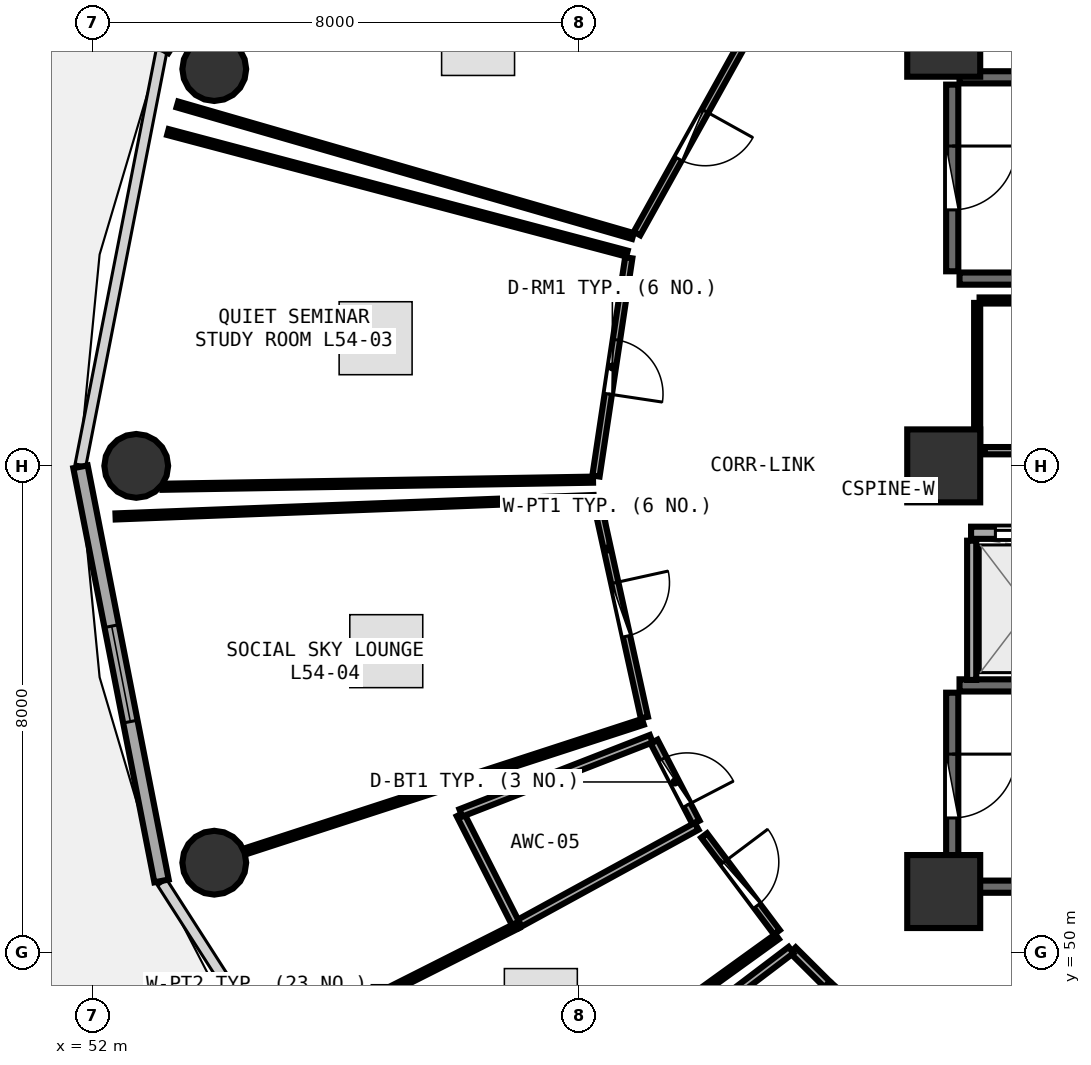
"""IFC4 building model, lengths in metres.
Left out: names, types, materials, properties, quantities, classifications, styles, units other than length and angle.
Written with IfcOpenShell. Run it as: python <this file> out.ifc"""

import sys

from ifc_helpers import new_model, si_unit, direction, frame, frame_2d, origin, origin_2d, place, context, subcontext, project, spatial, rectangle, circle, extrude, element, fill, save


model = new_model("IFC4")
c1 = context("Model", 3, precision=1e-05, world=origin(), true_north=direction((0.0, 1.0)))
c2 = subcontext(c1, "Body", "Model", "MODEL_VIEW")
j1 = project(units=[si_unit("LENGTHUNIT", "METRE"), si_unit("PLANEANGLEUNIT", "RADIAN")], contexts=[c1])
p1 = place(None, origin())
s1 = spatial("IfcSite", under=j1, at=p1, CompositionType="ELEMENT")
p2 = place(p1, origin())
s2 = spatial("IfcBuilding", under=s1, at=p2, CompositionType="ELEMENT")
p3 = place(p2, frame((0.0, 0.0, 211.95)))
s3 = spatial("IfcBuildingStorey", under=s2, at=p3, CompositionType="ELEMENT", Elevation=211.95)
for number, where, z_axis, x_axis in (
    (1, (66.0, 51.0, 0.0), (0.0, 0.0, 1.0), (1.0, 0.0, 0.0)),
    (2, (66.0, 65.0, 0.0), (0.0, 0.0, 1.0), (1.0, 0.0, 0.0)),
    (3, (66.0, 58.0, 0.0), (0.0, 0.0, 1.0), (1.0, 0.0, 0.0)),
):
    element("IfcColumn", number, at=place(p3, frame(where, z_axis=z_axis, x_axis=x_axis)), inside=s3, PredefinedType="PILASTER", context=c2, shape_type="SweptSolid", body=[
        extrude(rectangle(XDim=1.2, YDim=1.2, at=origin_2d()), origin(), (0.0, 0.0, 1.0), 3.75),
    ])
for number, where, z_axis, x_axis in (
    (4, (54.003, 64.526, 0.0), (0.0, 0.0, 1.0), (1.0, 0.0, 0.0)),
    (5, (52.72, 58.0, 0.0), (0.0, 0.0, 1.0), (1.0, 0.0, 0.0)),
    (6, (54.003, 51.474, 0.0), (0.0, 0.0, 1.0), (1.0, 0.0, 0.0)),
):
    element("IfcColumn", number, at=place(p3, frame(where, z_axis=z_axis, x_axis=x_axis)), inside=s3, PredefinedType="COLUMN", context=c2, shape_type="SweptSolid", body=[
        extrude(circle(Radius=0.525, at=origin_2d()), origin(), (0.0, 0.0, 1.0), 3.75),
    ])
p4 = place(p3, frame((56.986, 70.843, 0.0), z_axis=(0.0, 0.0, 1.0), x_axis=(-0.539539512973, -0.841960280501, 0.0)))
e7 = element("IfcWall", 7, at=p4, inside=s3, PredefinedType="SOLIDWALL", context=c2, shape_type="SweptSolid", body=[
    extrude(rectangle(XDim=7.115, YDim=0.24, at=frame_2d((3.557, 0.0))), origin(), (0.0, 0.0, 1.0), 3.475),
])
p5 = place(p4, frame((3.082, 0.0, 0.0)))
e8 = element("IfcOpeningElement", 8, at=p5, cuts=e7, PredefinedType="OPENING", context=c2, shape_type="SweptSolid", body=[
    extrude(rectangle(XDim=0.95, YDim=2.1, at=frame_2d((0.475, 1.05))), frame((0.0, 0.13, 0.0), z_axis=(0.0, -1.0, 0.0), x_axis=(1.0, 0.0, 0.0)), (0.0, 0.0, 1.0), 0.26),
])
p6 = place(p4, frame((4.382, 0.0, 0.85)))
e9 = element("IfcOpeningElement", 9, at=p6, cuts=e7, PredefinedType="OPENING", context=c2, shape_type="SweptSolid", body=[
    extrude(rectangle(XDim=1.2, YDim=1.45, at=frame_2d((0.6, 0.725))), frame((0.0, 0.13, 0.0), z_axis=(0.0, -1.0, 0.0), x_axis=(1.0, 0.0, 0.0)), (0.0, 0.0, 1.0), 0.26),
])
p7 = place(p3, frame((51.803, 57.985, 0.0), z_axis=(0.0, 0.0, 1.0), x_axis=(0.192069055673, -0.981381413036, 0.0)))
e10 = element("IfcWall", 10, at=p7, inside=s3, PredefinedType="SOLIDWALL", context=c2, shape_type="SweptSolid", body=[
    extrude(rectangle(XDim=6.94, YDim=0.24, at=frame_2d((3.47, 0.0))), origin(), (0.0, 0.0, 1.0), 3.475),
])
p8 = place(p7, frame((2.67, 0.0, 0.85)))
e11 = element("IfcOpeningElement", 11, at=p8, cuts=e10, PredefinedType="OPENING", context=c2, shape_type="SweptSolid", body=[
    extrude(rectangle(XDim=1.6, YDim=1.45, at=frame_2d((0.8, 0.725))), frame((0.0, 0.13, 0.0), z_axis=(0.0, -1.0, 0.0), x_axis=(1.0, 0.0, 0.0)), (0.0, 0.0, 1.0), 0.26),
])
for number, where, z_axis, x_axis in (
    (12, (66.26, 61.08, 0.0), (0.0, 0.0, 1.0), (1.0, 0.0, 0.0)),
    (13, (73.42, 64.39, 0.0), (0.0, 0.0, 1.0), (-1.0, 0.0, 0.0)),
):
    element("IfcWall", number, at=place(p3, frame(where, z_axis=z_axis, x_axis=x_axis)), inside=s3, PredefinedType="SHEAR", context=c2, shape_type="SweptSolid", body=[
        extrude(rectangle(XDim=7.16, YDim=0.2, at=frame_2d((3.58, 0.0))), origin(), (0.0, 0.0, 1.0), 3.49),
    ])
p9 = place(p3, frame((66.14, 64.27, 0.0), z_axis=(0.0, 0.0, 1.0), x_axis=(0.0, -1.0, 0.0)))
e14 = element("IfcWall", 14, at=p9, inside=s3, PredefinedType="SHEAR", context=c2, shape_type="SweptSolid", body=[
    extrude(rectangle(XDim=3.07, YDim=0.2, at=frame_2d((1.535, 0.0))), origin(), (0.0, 0.0, 1.0), 3.49),
])
p10 = place(p9, frame((1.01, 0.0, 0.0)))
e15 = element("IfcOpeningElement", 15, at=p10, cuts=e14, PredefinedType="OPENING", context=c2, shape_type="SweptSolid", body=[
    extrude(rectangle(XDim=1.05, YDim=2.1, at=frame_2d((0.525, 1.05))), frame((0.0, 0.11, 0.0), z_axis=(0.0, -1.0, 0.0), x_axis=(1.0, 0.0, 0.0)), (0.0, 0.0, 1.0), 0.22),
])
for number, where, z_axis, x_axis in (
    (16, (66.26, 51.08, 0.0), (0.0, 0.0, 1.0), (1.0, 0.0, 0.0)),
    (17, (73.42, 54.39, 0.0), (0.0, 0.0, 1.0), (-1.0, 0.0, 0.0)),
):
    element("IfcWall", number, at=place(p3, frame(where, z_axis=z_axis, x_axis=x_axis)), inside=s3, PredefinedType="SHEAR", context=c2, shape_type="SweptSolid", body=[
        extrude(rectangle(XDim=7.16, YDim=0.2, at=frame_2d((3.58, 0.0))), origin(), (0.0, 0.0, 1.0), 3.49),
    ])
p11 = place(p3, frame((66.14, 54.27, 0.0), z_axis=(0.0, 0.0, 1.0), x_axis=(0.0, -1.0, 0.0)))
e18 = element("IfcWall", 18, at=p11, inside=s3, PredefinedType="SHEAR", context=c2, shape_type="SweptSolid", body=[
    extrude(rectangle(XDim=3.07, YDim=0.2, at=frame_2d((1.535, 0.0))), origin(), (0.0, 0.0, 1.0), 3.49),
])
p12 = place(p11, frame((1.01, 0.0, 0.0)))
e19 = element("IfcOpeningElement", 19, at=p12, cuts=e18, PredefinedType="OPENING", context=c2, shape_type="SweptSolid", body=[
    extrude(rectangle(XDim=1.05, YDim=2.1, at=frame_2d((0.525, 1.05))), frame((0.0, 0.11, 0.0), z_axis=(0.0, -1.0, 0.0), x_axis=(1.0, 0.0, 0.0)), (0.0, 0.0, 1.0), 0.22),
])
p13 = place(p3, frame((66.45, 56.9, 0.0), z_axis=(0.0, 0.0, 1.0), x_axis=(1.0, 0.0, 0.0)))
e20 = element("IfcWall", 20, at=p13, inside=s3, PredefinedType="SOLIDWALL", context=c2, shape_type="SweptSolid", body=[
    extrude(rectangle(XDim=14.4, YDim=0.2, at=frame_2d((7.2, 0.0))), origin(), (0.0, 0.0, 1.0), 3.48),
])
p14 = place(p13, frame((0.4, 0.0, 0.0)))
e21 = element("IfcOpeningElement", 21, at=p14, cuts=e20, PredefinedType="OPENING", context=c2, shape_type="SweptSolid", body=[
    extrude(rectangle(XDim=1.1, YDim=2.1, at=frame_2d((0.55, 1.05))), frame((0.0, 0.11, 0.0), z_axis=(0.0, -1.0, 0.0), x_axis=(1.0, 0.0, 0.0)), (0.0, 0.0, 1.0), 0.22),
])
p15 = place(p13, frame((2.4, 0.0, 0.0)))
e22 = element("IfcOpeningElement", 22, at=p15, cuts=e20, PredefinedType="OPENING", context=c2, shape_type="SweptSolid", body=[
    extrude(rectangle(XDim=1.1, YDim=2.1, at=frame_2d((0.55, 1.05))), frame((0.0, 0.11, 0.0), z_axis=(0.0, -1.0, 0.0), x_axis=(1.0, 0.0, 0.0)), (0.0, 0.0, 1.0), 0.22),
])
p16 = place(p13, frame((4.4, 0.0, 0.0)))
e23 = element("IfcOpeningElement", 23, at=p16, cuts=e20, PredefinedType="OPENING", context=c2, shape_type="SweptSolid", body=[
    extrude(rectangle(XDim=1.1, YDim=2.1, at=frame_2d((0.55, 1.05))), frame((0.0, 0.11, 0.0), z_axis=(0.0, -1.0, 0.0), x_axis=(1.0, 0.0, 0.0)), (0.0, 0.0, 1.0), 0.22),
])
p17 = place(p3, frame((66.46, 54.48, 0.0), z_axis=(0.0, 0.0, 1.0), x_axis=(0.0, 1.0, 0.0)))
e24 = element("IfcWall", 24, at=p17, inside=s3, PredefinedType="PARTITIONING", context=c2, shape_type="SweptSolid", body=[
    extrude(rectangle(XDim=2.29, YDim=0.15, at=frame_2d((1.145, 0.0))), origin(), (0.0, 0.0, 1.0), 3.48),
])
p18 = place(p3, frame((66.675, 58.25, 0.0), z_axis=(0.0, 0.0, 1.0), x_axis=(1.0, 0.0, 0.0)))
e25 = element("IfcWall", 25, at=p18, inside=s3, PredefinedType="PARTITIONING", context=c2, shape_type="SweptSolid", body=[
    extrude(rectangle(XDim=3.265, YDim=0.12, at=frame_2d((1.632, 0.0))), origin(), (0.0, 0.0, 1.0), 3.48),
])
p19 = place(p18, frame((1.182, 0.0, 0.0)))
e26 = element("IfcOpeningElement", 26, at=p19, cuts=e25, PredefinedType="OPENING", context=c2, shape_type="SweptSolid", body=[
    extrude(rectangle(XDim=0.9, YDim=2.08, at=frame_2d((0.45, 1.04))), frame((0.0, 0.07, 0.0), z_axis=(0.0, -1.0, 0.0), x_axis=(1.0, 0.0, 0.0)), (0.0, 0.0, 1.0), 0.14),
])
p20 = place(p3, frame((62.759, 65.064, 0.0), z_axis=(0.0, 0.0, 1.0), x_axis=(-0.485877595764, -0.874026865683, 0.0)))
e27 = element("IfcWall", 27, at=p20, inside=s3, PredefinedType="PARTITIONING", context=c2, shape_type="SweptSolid", body=[
    extrude(rectangle(XDim=3.71, YDim=0.12, at=frame_2d((1.855, 0.0))), origin(), (0.0, 0.0, 1.0), 3.025),
])
p21 = place(p20, frame((1.405, 0.0, 0.0)))
e28 = element("IfcOpeningElement", 28, at=p21, cuts=e27, PredefinedType="OPENING", context=c2, shape_type="SweptSolid", body=[
    extrude(rectangle(XDim=0.9, YDim=2.08, at=frame_2d((0.45, 1.04))), frame((0.0, 0.07, 0.0), z_axis=(0.0, -1.0, 0.0), x_axis=(1.0, 0.0, 0.0)), (0.0, 0.0, 1.0), 0.14),
])
p22 = place(p3, frame((60.82, 61.422, 0.0), z_axis=(0.0, 0.0, 1.0), x_axis=(-0.148557592641, -0.988903757536, 0.0)))
e29 = element("IfcWall", 29, at=p22, inside=s3, PredefinedType="PARTITIONING", context=c2, shape_type="SweptSolid", body=[
    extrude(rectangle(XDim=3.629, YDim=0.12, at=frame_2d((1.814, 0.0))), origin(), (0.0, 0.0, 1.0), 3.025),
])
p23 = place(p22, frame((1.364, 0.0, 0.0)))
e30 = element("IfcOpeningElement", 30, at=p23, cuts=e29, PredefinedType="OPENING", context=c2, shape_type="SweptSolid", body=[
    extrude(rectangle(XDim=0.9, YDim=2.08, at=frame_2d((0.45, 1.04))), frame((0.0, 0.07, 0.0), z_axis=(0.0, -1.0, 0.0), x_axis=(1.0, 0.0, 0.0)), (0.0, 0.0, 1.0), 0.14),
])
p24 = place(p3, frame((60.296, 57.414, 0.0), z_axis=(0.0, 0.0, 1.0), x_axis=(0.214769597133, -0.976664742963, 0.0)))
e31 = element("IfcWall", 31, at=p24, inside=s3, PredefinedType="PARTITIONING", context=c2, shape_type="SweptSolid", body=[
    extrude(rectangle(XDim=3.638, YDim=0.12, at=frame_2d((1.819, 0.0))), origin(), (0.0, 0.0, 1.0), 3.48),
])
p25 = place(p24, frame((1.369, 0.0, 0.0)))
e32 = element("IfcOpeningElement", 32, at=p25, cuts=e31, PredefinedType="OPENING", context=c2, shape_type="SweptSolid", body=[
    extrude(rectangle(XDim=0.9, YDim=2.08, at=frame_2d((0.45, 1.04))), frame((0.0, 0.07, 0.0), z_axis=(0.0, -1.0, 0.0), x_axis=(1.0, 0.0, 0.0)), (0.0, 0.0, 1.0), 0.14),
])
p26 = place(p3, frame((61.236, 53.468, 0.0), z_axis=(0.0, 0.0, 1.0), x_axis=(0.460573669508, -0.887621481802, 0.0)))
e33 = element("IfcWall", 33, at=p26, inside=s3, PredefinedType="PLUMBINGWALL", context=c2, shape_type="SweptSolid", body=[
    extrude(rectangle(XDim=1.5, YDim=0.13, at=frame_2d((0.75, 0.0))), origin(), (0.0, 0.0, 1.0), 3.235),
])
p27 = place(p26, frame((0.32, 0.0, 0.0)))
e34 = element("IfcOpeningElement", 34, at=p27, cuts=e33, PredefinedType="OPENING", context=c2, shape_type="SweptSolid", body=[
    extrude(rectangle(XDim=0.86, YDim=2.05, at=frame_2d((0.43, 1.025))), frame((0.0, 0.075, 0.0), z_axis=(0.0, -1.0, 0.0), x_axis=(1.0, 0.0, 0.0)), (0.0, 0.0, 1.0), 0.15),
])
p28 = place(p3, frame((62.06, 51.922, 0.0), z_axis=(0.0, 0.0, 1.0), x_axis=(0.600647163637, -0.799514218019, 0.0)))
e35 = element("IfcWall", 35, at=p28, inside=s3, PredefinedType="PARTITIONING", context=c2, shape_type="SweptSolid", body=[
    extrude(rectangle(XDim=1.991, YDim=0.12, at=frame_2d((0.996, 0.0))), origin(), (0.0, 0.0, 1.0), 3.025),
])
p29 = place(p28, frame((0.546, 0.0, 0.0)))
e36 = element("IfcOpeningElement", 36, at=p29, cuts=e35, PredefinedType="OPENING", context=c2, shape_type="SweptSolid", body=[
    extrude(rectangle(XDim=0.9, YDim=2.08, at=frame_2d((0.45, 1.04))), frame((0.0, 0.07, 0.0), z_axis=(0.0, -1.0, 0.0), x_axis=(1.0, 0.0, 0.0)), (0.0, 0.0, 1.0), 0.14),
])
p30 = place(p3, frame((69.96, 60.72, 0.0), z_axis=(0.0, 0.0, 1.0), x_axis=(-1.0, 0.0, 0.0)))
e37 = element("IfcWall", 37, at=p30, inside=s3, PredefinedType="PARTITIONING", context=c2, shape_type="SweptSolid", body=[
    extrude(rectangle(XDim=3.37, YDim=0.1, at=frame_2d((1.685, 0.0))), origin(), (0.0, 0.0, 1.0), 3.48),
])
p31 = place(p3, frame((66.55, 60.68, 0.0), z_axis=(0.0, 0.0, 1.0), x_axis=(0.0, -1.0, 0.0)))
e38 = element("IfcWall", 38, at=p31, inside=s3, PredefinedType="PARTITIONING", context=c2, shape_type="SweptSolid", body=[
    extrude(rectangle(XDim=2.383, YDim=0.1, at=frame_2d((1.191, 0.0))), origin(), (0.0, 0.0, 1.0), 3.48),
])
p32 = place(p3, frame((60.889, 61.78, 0.0), z_axis=(0.0, 0.0, 1.0), x_axis=(-0.960734399679, 0.277469661899, 0.0)))
e39 = element("IfcWall", 39, at=p32, inside=s3, PredefinedType="PARTITIONING", context=c2, shape_type="SweptSolid", body=[
    extrude(rectangle(XDim=7.798, YDim=0.1, at=frame_2d((3.899, 0.0))), origin(), (0.0, 0.0, 1.0), 3.075),
])
p33 = place(p3, frame((60.232, 57.773, 0.0), z_axis=(0.0, 0.0, 1.0), x_axis=(-0.999864271248, -0.016475408379, 0.0)))
e40 = element("IfcWall", 40, at=p33, inside=s3, PredefinedType="PARTITIONING", context=c2, shape_type="SweptSolid", body=[
    extrude(rectangle(XDim=7.083, YDim=0.1, at=frame_2d((3.542, 0.0))), origin(), (0.0, 0.0, 1.0), 3.175),
])
p34 = place(p3, frame((53.241, 63.49, 0.0), z_axis=(0.0, 0.0, 1.0), x_axis=(0.966701361123, -0.25590716755, 0.0)))
e41 = element("IfcWall", 41, at=p34, inside=s3, PredefinedType="PARTITIONING", context=c2, shape_type="SweptSolid", body=[
    extrude(rectangle(XDim=7.81, YDim=0.1, at=frame_2d((3.905, 0.0))), origin(), (0.0, 0.0, 1.0), 3.075),
])
p35 = place(p3, frame((61.052, 53.791, 0.0), z_axis=(0.0, 0.0, 1.0), x_axis=(-0.950863645771, -0.309609959708, 0.0)))
e42 = element("IfcWall", 42, at=p35, inside=s3, PredefinedType="PARTITIONING", context=c2, shape_type="SweptSolid", body=[
    extrude(rectangle(XDim=6.87, YDim=0.1, at=frame_2d((3.435, 0.0))), origin(), (0.0, 0.0, 1.0), 3.175),
])
p36 = place(p3, frame((52.38, 57.168, 0.0), z_axis=(0.0, 0.0, 1.0), x_axis=(0.999258468257, 0.038503423452, 0.0)))
e43 = element("IfcWall", 43, at=p36, inside=s3, PredefinedType="PARTITIONING", context=c2, shape_type="SweptSolid", body=[
    extrude(rectangle(XDim=7.869, YDim=0.1, at=frame_2d((3.935, 0.0))), origin(), (0.0, 0.0, 1.0), 3.075),
])
p37 = place(p3, frame((61.937, 52.073, 0.0), z_axis=(0.0, 0.0, 1.0), x_axis=(-0.877295143091, -0.479951280767, 0.0)))
e44 = element("IfcWall", 44, at=p37, inside=s3, PredefinedType="PLUMBINGWALL", context=c2, shape_type="SweptSolid", body=[
    extrude(rectangle(XDim=3.36, YDim=0.13, at=frame_2d((1.68, 0.0))), origin(), (0.0, 0.0, 1.0), 3.025),
])
p38 = place(p3, frame((58.962, 50.469, 0.0), z_axis=(0.0, 0.0, 1.0), x_axis=(-0.452384505313, 0.891822997771, 0.0)))
e45 = element("IfcWall", 45, at=p38, inside=s3, PredefinedType="PLUMBINGWALL", context=c2, shape_type="SweptSolid", body=[
    extrude(rectangle(XDim=2.018, YDim=0.13, at=frame_2d((1.009, 0.0))), origin(), (0.0, 0.0, 1.0), 3.025),
])
p39 = place(p3, frame((58.059, 52.293, 0.0), z_axis=(0.0, 0.0, 1.0), x_axis=(0.931712585556, 0.363196445352, 0.0)))
e46 = element("IfcWall", 46, at=p39, inside=s3, PredefinedType="PLUMBINGWALL", context=c2, shape_type="SweptSolid", body=[
    extrude(rectangle(XDim=3.36, YDim=0.13, at=frame_2d((1.68, 0.0))), origin(), (0.0, 0.0, 1.0), 3.175),
])
p40 = place(p3, frame((63.26, 50.259, 0.0), z_axis=(0.0, 0.0, 1.0), x_axis=(-0.810850730514, -0.585253016076, 0.0)))
e47 = element("IfcWall", 47, at=p40, inside=s3, PredefinedType="PARTITIONING", context=c2, shape_type="SweptSolid", body=[
    extrude(rectangle(XDim=6.793, YDim=0.1, at=frame_2d((3.396, 0.0))), origin(), (0.0, 0.0, 1.0), 3.175),
])
p41 = place(p3, frame((55.125, 48.491, 0.0), z_axis=(0.0, 0.0, 1.0), x_axis=(0.892902240534, 0.450250584507, 0.0)))
e48 = element("IfcWall", 48, at=p41, inside=s3, PredefinedType="PARTITIONING", context=c2, shape_type="SweptSolid", body=[
    extrude(rectangle(XDim=4.337, YDim=0.1, at=frame_2d((2.169, 0.0))), origin(), (0.0, 0.0, 1.0), 3.075),
])
p42 = place(p3, frame((63.519, 50.036, 0.0), z_axis=(0.0, 0.0, 1.0), x_axis=(0.708179895313, -0.706032036012, 0.0)))
e49 = element("IfcWall", 49, at=p42, inside=s3, PredefinedType="PLUMBINGWALL", context=c2, shape_type="SweptSolid", body=[
    extrude(rectangle(XDim=0.796, YDim=0.13, at=frame_2d((0.398, 0.0))), origin(), (0.0, 0.0, 1.0), 3.025),
])
p43 = place(p3, frame((64.112, 49.447, 0.0), z_axis=(0.0, 0.0, 1.0), x_axis=(0.751480759656, -0.659755005943, 0.0)))
e50 = element("IfcWall", 50, at=p43, inside=s3, PredefinedType="PLUMBINGWALL", context=c2, shape_type="SweptSolid", body=[
    extrude(rectangle(XDim=0.801, YDim=0.13, at=frame_2d((0.401, 0.0))), origin(), (0.0, 0.0, 1.0), 3.48),
])
p44 = place(p3, frame((60.575, 47.828, 0.0), z_axis=(0.0, 0.0, 1.0), x_axis=(0.79681650582, 0.604221363453, 0.0)))
e51 = element("IfcWall", 51, at=p44, inside=s3, PredefinedType="PLUMBINGWALL", context=c2, shape_type="SweptSolid", body=[
    extrude(rectangle(XDim=3.657, YDim=0.13, at=frame_2d((1.829, 0.0))), origin(), (0.0, 0.0, 1.0), 3.175),
])
p45 = place(p8, origin())
e52 = element("IfcWindow", 52, at=p45, inside=s3, PartitioningType="SINGLE_PANEL", PredefinedType="WINDOW", context=c2, shape_type="SweptSolid", body=[
    extrude(rectangle(XDim=1.6, YDim=1.45, at=frame_2d((0.8, 0.725))), frame((0.0, 0.03, 0.0), z_axis=(0.0, -1.0, 0.0), x_axis=(1.0, 0.0, 0.0)), (0.0, 0.0, 1.0), 0.06),
])
fill(e11, e52)
p46 = place(p10, origin())
e53 = element("IfcDoor", 53, at=p46, inside=s3, OperationType="SINGLE_SWING_LEFT", PredefinedType="DOOR", context=c2, shape_type="SweptSolid", body=[
    extrude(rectangle(XDim=1.05, YDim=2.1, at=frame_2d((0.525, 1.05))), frame((0.0, 0.025, 0.0), z_axis=(0.0, -1.0, 0.0), x_axis=(1.0, 0.0, 0.0)), (0.0, 0.0, 1.0), 0.05),
])
fill(e15, e53)
p47 = place(p12, origin())
e54 = element("IfcDoor", 54, at=p47, inside=s3, OperationType="SINGLE_SWING_LEFT", PredefinedType="DOOR", context=c2, shape_type="SweptSolid", body=[
    extrude(rectangle(XDim=1.05, YDim=2.1, at=frame_2d((0.525, 1.05))), frame((0.0, 0.025, 0.0), z_axis=(0.0, -1.0, 0.0), x_axis=(1.0, 0.0, 0.0)), (0.0, 0.0, 1.0), 0.05),
])
fill(e19, e54)
p48 = place(p14, origin())
e55 = element("IfcDoor", 55, at=p48, inside=s3, OperationType="DOUBLE_DOOR_SLIDING", PredefinedType="DOOR", context=c2, shape_type="SweptSolid", body=[
    extrude(rectangle(XDim=1.1, YDim=2.1, at=frame_2d((0.55, 1.05))), frame((0.0, 0.025, 0.0), z_axis=(0.0, -1.0, 0.0), x_axis=(1.0, 0.0, 0.0)), (0.0, 0.0, 1.0), 0.05),
])
fill(e21, e55)
p49 = place(p21, origin())
e56 = element("IfcDoor", 56, at=p49, inside=s3, OperationType="SINGLE_SWING_LEFT", PredefinedType="DOOR", context=c2, shape_type="SweptSolid", body=[
    extrude(rectangle(XDim=0.9, YDim=2.08, at=frame_2d((0.45, 1.04))), frame((0.0, 0.025, 0.0), z_axis=(0.0, -1.0, 0.0), x_axis=(1.0, 0.0, 0.0)), (0.0, 0.0, 1.0), 0.05),
])
fill(e28, e56)
p50 = place(p23, origin())
e57 = element("IfcDoor", 57, at=p50, inside=s3, OperationType="SINGLE_SWING_RIGHT", PredefinedType="DOOR", context=c2, shape_type="SweptSolid", body=[
    extrude(rectangle(XDim=0.9, YDim=2.08, at=frame_2d((0.45, 1.04))), frame((0.0, 0.025, 0.0), z_axis=(0.0, -1.0, 0.0), x_axis=(1.0, 0.0, 0.0)), (0.0, 0.0, 1.0), 0.05),
])
fill(e30, e57)
p51 = place(p25, origin())
e58 = element("IfcDoor", 58, at=p51, inside=s3, OperationType="SINGLE_SWING_LEFT", PredefinedType="DOOR", context=c2, shape_type="SweptSolid", body=[
    extrude(rectangle(XDim=0.9, YDim=2.08, at=frame_2d((0.45, 1.04))), frame((0.0, 0.025, 0.0), z_axis=(0.0, -1.0, 0.0), x_axis=(1.0, 0.0, 0.0)), (0.0, 0.0, 1.0), 0.05),
])
fill(e32, e58)
p52 = place(p27, origin())
e59 = element("IfcDoor", 59, at=p52, inside=s3, OperationType="SINGLE_SWING_RIGHT", PredefinedType="DOOR", context=c2, shape_type="SweptSolid", body=[
    extrude(rectangle(XDim=0.86, YDim=2.05, at=frame_2d((0.43, 1.025))), frame((0.0, 0.025, 0.0), z_axis=(0.0, -1.0, 0.0), x_axis=(1.0, 0.0, 0.0)), (0.0, 0.0, 1.0), 0.05),
])
fill(e34, e59)
p53 = place(p29, origin())
e60 = element("IfcDoor", 60, at=p53, inside=s3, OperationType="SINGLE_SWING_LEFT", PredefinedType="DOOR", context=c2, shape_type="SweptSolid", body=[
    extrude(rectangle(XDim=0.9, YDim=2.08, at=frame_2d((0.45, 1.04))), frame((0.0, 0.025, 0.0), z_axis=(0.0, -1.0, 0.0), x_axis=(1.0, 0.0, 0.0)), (0.0, 0.0, 1.0), 0.05),
])
fill(e36, e60)
save(model, sys.argv[1])
